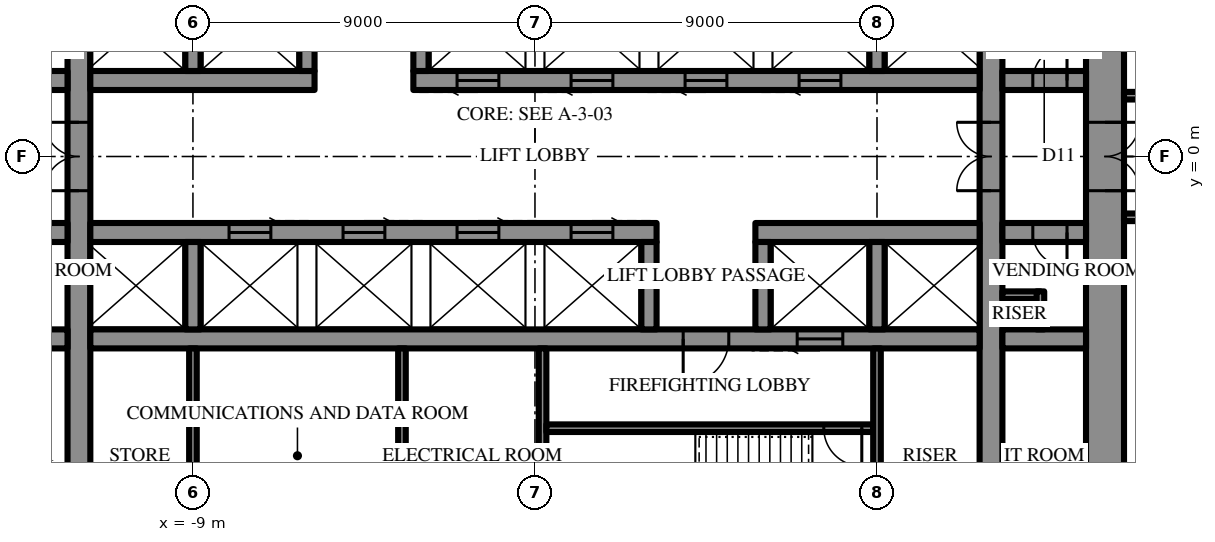
"""IFC4 building model, lengths in metres.
Left out: names, types, materials, properties, quantities, classifications, styles, units other than length and angle.
Written with IfcOpenShell. Run it as: python <this file> out.ifc"""

import sys

from ifc_helpers import new_model, si_unit, direction, frame, frame_2d, origin, place, context, subcontext, project, spatial, rectangle, extrude, element, fill, save


model = new_model("IFC4")
c1 = context("Model", 3, precision=1e-05, world=origin(), true_north=direction((0.0, 1.0)))
c2 = subcontext(c1, "Body", "Model", "MODEL_VIEW")
j1 = project(units=[si_unit("LENGTHUNIT", "METRE"), si_unit("PLANEANGLEUNIT", "RADIAN")], contexts=[c1])
p1 = place(None, origin())
s1 = spatial("IfcSite", under=j1, at=p1, CompositionType="ELEMENT")
p2 = place(p1, origin())
s2 = spatial("IfcBuilding", under=s1, at=p2, CompositionType="ELEMENT")
p3 = place(p2, frame((0.0, 0.0, 219.7)))
s3 = spatial("IfcBuildingStorey", under=s2, at=p3, CompositionType="ELEMENT", Elevation=219.7)
p4 = place(p3, frame((15.0, -10.7, 0.0), z_axis=(0.0, 0.0, 1.0), x_axis=(0.0, 1.0, 0.0)))
e1 = element("IfcWall", 1, at=p4, inside=s3, PredefinedType="SHEAR", context=c2, shape_type="SweptSolid", body=[
    extrude(rectangle(XDim=21.4, YDim=1.0, at=frame_2d((10.7, 0.0))), origin(), (0.0, 0.0, 1.0), 4.2),
])
p5 = place(p4, frame((9.8, 0.0, 0.0)))
e2 = element("IfcOpeningElement", 2, at=p5, cuts=e1, PredefinedType="OPENING", context=c2, shape_type="SweptSolid", body=[
    extrude(rectangle(XDim=1.8, YDim=2.4, at=frame_2d((0.9, 1.2))), frame((0.0, 0.51, 0.0), z_axis=(0.0, -1.0, 0.0), x_axis=(1.0, 0.0, 0.0)), (0.0, 0.0, 1.0), 1.02),
])
p6 = place(p3, frame((12.0, -10.7, 0.0), z_axis=(0.0, 0.0, 1.0), x_axis=(0.0, 1.0, 0.0)))
e3 = element("IfcWall", 3, at=p6, inside=s3, PredefinedType="SHEAR", context=c2, shape_type="SweptSolid", body=[
    extrude(rectangle(XDim=21.4, YDim=0.6, at=frame_2d((10.7, 0.0))), origin(), (0.0, 0.0, 1.0), 4.2),
])
p7 = place(p6, frame((9.8, 0.0, 0.0)))
e4 = element("IfcOpeningElement", 4, at=p7, cuts=e3, PredefinedType="OPENING", context=c2, shape_type="SweptSolid", body=[
    extrude(rectangle(XDim=1.8, YDim=2.4, at=frame_2d((0.9, 1.2))), frame((0.0, 0.31, 0.0), z_axis=(0.0, -1.0, 0.0), x_axis=(1.0, 0.0, 0.0)), (0.0, 0.0, 1.0), 0.62),
])
p8 = place(p3, frame((-12.0, -10.7, 0.0), z_axis=(0.0, 0.0, 1.0), x_axis=(0.0, 1.0, 0.0)))
e5 = element("IfcWall", 5, at=p8, inside=s3, PredefinedType="SHEAR", context=c2, shape_type="SweptSolid", body=[
    extrude(rectangle(XDim=21.4, YDim=0.6, at=frame_2d((10.7, 0.0))), origin(), (0.0, 0.0, 1.0), 4.2),
])
p9 = place(p8, frame((9.8, 0.0, 0.0)))
e6 = element("IfcOpeningElement", 6, at=p9, cuts=e5, PredefinedType="OPENING", context=c2, shape_type="SweptSolid", body=[
    extrude(rectangle(XDim=1.8, YDim=2.4, at=frame_2d((0.9, 1.2))), frame((0.0, 0.31, 0.0), z_axis=(0.0, -1.0, 0.0), x_axis=(1.0, 0.0, 0.0)), (0.0, 0.0, 1.0), 0.62),
])
p10 = place(p3, frame((-14.5, 2.0, 0.0), z_axis=(0.0, 0.0, 1.0), x_axis=(1.0, 0.0, 0.0)))
e7 = element("IfcWall", 7, at=p10, inside=s3, PredefinedType="SHEAR", context=c2, shape_type="SweptSolid", body=[
    extrude(rectangle(XDim=2.2, YDim=0.5, at=frame_2d((1.1, 0.0))), origin(), (0.0, 0.0, 1.0), 4.2),
])
p11 = place(p10, frame((0.5, 0.0, 0.0)))
e8 = element("IfcOpeningElement", 8, at=p11, cuts=e7, PredefinedType="OPENING", context=c2, shape_type="SweptSolid", body=[
    extrude(rectangle(XDim=0.9, YDim=2.2, at=frame_2d((0.45, 1.1))), frame((0.0, 0.26, 0.0), z_axis=(0.0, -1.0, 0.0), x_axis=(1.0, 0.0, 0.0)), (0.0, 0.0, 1.0), 0.52),
])
p12 = place(p3, frame((-11.7, 2.0, 0.0), z_axis=(0.0, 0.0, 1.0), x_axis=(1.0, 0.0, 0.0)))
e9 = element("IfcWall", 9, at=p12, inside=s3, PredefinedType="SHEAR", context=c2, shape_type="SweptSolid", body=[
    extrude(rectangle(XDim=5.9, YDim=0.5, at=frame_2d((2.95, 0.0))), origin(), (0.0, 0.0, 1.0), 4.2),
])
p13 = place(p3, frame((-3.2, 2.0, 0.0), z_axis=(0.0, 0.0, 1.0), x_axis=(1.0, 0.0, 0.0)))
e10 = element("IfcWall", 10, at=p13, inside=s3, PredefinedType="SHEAR", context=c2, shape_type="SweptSolid", body=[
    extrude(rectangle(XDim=14.9, YDim=0.5, at=frame_2d((7.45, 0.0))), origin(), (0.0, 0.0, 1.0), 4.2),
])
p14 = place(p13, frame((1.15, 0.0, 0.0)))
e11 = element("IfcOpeningElement", 11, at=p14, cuts=e10, PredefinedType="OPENING", context=c2, shape_type="SweptSolid", body=[
    extrude(rectangle(XDim=1.1, YDim=2.2, at=frame_2d((0.55, 1.1))), frame((0.0, 0.26, 0.0), z_axis=(0.0, -1.0, 0.0), x_axis=(1.0, 0.0, 0.0)), (0.0, 0.0, 1.0), 0.52),
])
p15 = place(p13, frame((4.15, 0.0, 0.0)))
e12 = element("IfcOpeningElement", 12, at=p15, cuts=e10, PredefinedType="OPENING", context=c2, shape_type="SweptSolid", body=[
    extrude(rectangle(XDim=1.1, YDim=2.2, at=frame_2d((0.55, 1.1))), frame((0.0, 0.26, 0.0), z_axis=(0.0, -1.0, 0.0), x_axis=(1.0, 0.0, 0.0)), (0.0, 0.0, 1.0), 0.52),
])
p16 = place(p13, frame((7.15, 0.0, 0.0)))
e13 = element("IfcOpeningElement", 13, at=p16, cuts=e10, PredefinedType="OPENING", context=c2, shape_type="SweptSolid", body=[
    extrude(rectangle(XDim=1.1, YDim=2.2, at=frame_2d((0.55, 1.1))), frame((0.0, 0.26, 0.0), z_axis=(0.0, -1.0, 0.0), x_axis=(1.0, 0.0, 0.0)), (0.0, 0.0, 1.0), 0.52),
])
p17 = place(p13, frame((10.15, 0.0, 0.0)))
e14 = element("IfcOpeningElement", 14, at=p17, cuts=e10, PredefinedType="OPENING", context=c2, shape_type="SweptSolid", body=[
    extrude(rectangle(XDim=1.1, YDim=2.2, at=frame_2d((0.55, 1.1))), frame((0.0, 0.26, 0.0), z_axis=(0.0, -1.0, 0.0), x_axis=(1.0, 0.0, 0.0)), (0.0, 0.0, 1.0), 0.52),
])
p18 = place(p3, frame((12.3, 2.0, 0.0), z_axis=(0.0, 0.0, 1.0), x_axis=(1.0, 0.0, 0.0)))
e15 = element("IfcWall", 15, at=p18, inside=s3, PredefinedType="SHEAR", context=c2, shape_type="SweptSolid", body=[
    extrude(rectangle(XDim=2.2, YDim=0.5, at=frame_2d((1.1, 0.0))), origin(), (0.0, 0.0, 1.0), 4.2),
])
p19 = place(p18, frame((0.8, 0.0, 0.0)))
e16 = element("IfcOpeningElement", 16, at=p19, cuts=e15, PredefinedType="OPENING", context=c2, shape_type="SweptSolid", body=[
    extrude(rectangle(XDim=0.9, YDim=2.2, at=frame_2d((0.45, 1.1))), frame((0.0, 0.26, 0.0), z_axis=(0.0, -1.0, 0.0), x_axis=(1.0, 0.0, 0.0)), (0.0, 0.0, 1.0), 0.52),
])
for number, where, z_axis, x_axis in (
    (17, (-9.0, 2.25, 0.0), (0.0, 0.0, 1.0), (0.0, 1.0, 0.0)),
    (18, (-6.0, 2.25, 0.0), (0.0, 0.0, 1.0), (0.0, 1.0, 0.0)),
    (19, (-3.0, 2.25, 0.0), (0.0, 0.0, 1.0), (0.0, 1.0, 0.0)),
    (20, (9.0, 2.25, 0.0), (0.0, 0.0, 1.0), (0.0, 1.0, 0.0)),
):
    element("IfcWall", number, at=place(p3, frame(where, z_axis=z_axis, x_axis=x_axis)), inside=s3, PredefinedType="SHEAR", context=c2, shape_type="SweptSolid", body=[
        extrude(rectangle(XDim=2.3, YDim=0.4, at=frame_2d((1.15, 0.0))), origin(), (0.0, 0.0, 1.0), 4.2),
    ])
p20 = place(p3, frame((14.5, -2.0, 0.0), z_axis=(0.0, 0.0, 1.0), x_axis=(-1.0, 0.0, 0.0)))
e21 = element("IfcWall", 21, at=p20, inside=s3, PredefinedType="SHEAR", context=c2, shape_type="SweptSolid", body=[
    extrude(rectangle(XDim=2.2, YDim=0.5, at=frame_2d((1.1, 0.0))), origin(), (0.0, 0.0, 1.0), 4.2),
])
p21 = place(p20, frame((0.5, 0.0, 0.0)))
e22 = element("IfcOpeningElement", 22, at=p21, cuts=e21, PredefinedType="OPENING", context=c2, shape_type="SweptSolid", body=[
    extrude(rectangle(XDim=0.9, YDim=2.2, at=frame_2d((0.45, 1.1))), frame((0.0, 0.26, 0.0), z_axis=(0.0, -1.0, 0.0), x_axis=(1.0, 0.0, 0.0)), (0.0, 0.0, 1.0), 0.52),
])
p22 = place(p3, frame((11.7, -2.0, 0.0), z_axis=(0.0, 0.0, 1.0), x_axis=(-1.0, 0.0, 0.0)))
e23 = element("IfcWall", 23, at=p22, inside=s3, PredefinedType="SHEAR", context=c2, shape_type="SweptSolid", body=[
    extrude(rectangle(XDim=5.9, YDim=0.5, at=frame_2d((2.95, 0.0))), origin(), (0.0, 0.0, 1.0), 4.2),
])
p23 = place(p3, frame((3.2, -2.0, 0.0), z_axis=(0.0, 0.0, 1.0), x_axis=(-1.0, 0.0, 0.0)))
e24 = element("IfcWall", 24, at=p23, inside=s3, PredefinedType="SHEAR", context=c2, shape_type="SweptSolid", body=[
    extrude(rectangle(XDim=14.9, YDim=0.5, at=frame_2d((7.45, 0.0))), origin(), (0.0, 0.0, 1.0), 4.2),
])
p24 = place(p23, frame((1.15, 0.0, 0.0)))
e25 = element("IfcOpeningElement", 25, at=p24, cuts=e24, PredefinedType="OPENING", context=c2, shape_type="SweptSolid", body=[
    extrude(rectangle(XDim=1.1, YDim=2.2, at=frame_2d((0.55, 1.1))), frame((0.0, 0.26, 0.0), z_axis=(0.0, -1.0, 0.0), x_axis=(1.0, 0.0, 0.0)), (0.0, 0.0, 1.0), 0.52),
])
p25 = place(p23, frame((4.15, 0.0, 0.0)))
e26 = element("IfcOpeningElement", 26, at=p25, cuts=e24, PredefinedType="OPENING", context=c2, shape_type="SweptSolid", body=[
    extrude(rectangle(XDim=1.1, YDim=2.2, at=frame_2d((0.55, 1.1))), frame((0.0, 0.26, 0.0), z_axis=(0.0, -1.0, 0.0), x_axis=(1.0, 0.0, 0.0)), (0.0, 0.0, 1.0), 0.52),
])
p26 = place(p23, frame((7.15, 0.0, 0.0)))
e27 = element("IfcOpeningElement", 27, at=p26, cuts=e24, PredefinedType="OPENING", context=c2, shape_type="SweptSolid", body=[
    extrude(rectangle(XDim=1.1, YDim=2.2, at=frame_2d((0.55, 1.1))), frame((0.0, 0.26, 0.0), z_axis=(0.0, -1.0, 0.0), x_axis=(1.0, 0.0, 0.0)), (0.0, 0.0, 1.0), 0.52),
])
p27 = place(p23, frame((10.15, 0.0, 0.0)))
e28 = element("IfcOpeningElement", 28, at=p27, cuts=e24, PredefinedType="OPENING", context=c2, shape_type="SweptSolid", body=[
    extrude(rectangle(XDim=1.1, YDim=2.2, at=frame_2d((0.55, 1.1))), frame((0.0, 0.26, 0.0), z_axis=(0.0, -1.0, 0.0), x_axis=(1.0, 0.0, 0.0)), (0.0, 0.0, 1.0), 0.52),
])
p28 = place(p3, frame((-12.3, -2.0, 0.0), z_axis=(0.0, 0.0, 1.0), x_axis=(-1.0, 0.0, 0.0)))
e29 = element("IfcWall", 29, at=p28, inside=s3, PredefinedType="SHEAR", context=c2, shape_type="SweptSolid", body=[
    extrude(rectangle(XDim=2.2, YDim=0.5, at=frame_2d((1.1, 0.0))), origin(), (0.0, 0.0, 1.0), 4.2),
])
p29 = place(p28, frame((0.8, 0.0, 0.0)))
e30 = element("IfcOpeningElement", 30, at=p29, cuts=e29, PredefinedType="OPENING", context=c2, shape_type="SweptSolid", body=[
    extrude(rectangle(XDim=0.9, YDim=2.2, at=frame_2d((0.45, 1.1))), frame((0.0, 0.26, 0.0), z_axis=(0.0, -1.0, 0.0), x_axis=(1.0, 0.0, 0.0)), (0.0, 0.0, 1.0), 0.52),
])
p30 = place(p3, frame((14.5, -4.8, 0.0), z_axis=(0.0, 0.0, 1.0), x_axis=(-1.0, 0.0, 0.0)))
e31 = element("IfcWall", 31, at=p30, inside=s3, PredefinedType="SHEAR", context=c2, shape_type="SweptSolid", body=[
    extrude(rectangle(XDim=2.2, YDim=0.5, at=frame_2d((1.1, 0.0))), origin(), (0.0, 0.0, 1.0), 4.2),
])
p31 = place(p3, frame((11.7, -4.8, 0.0), z_axis=(0.0, 0.0, 1.0), x_axis=(-1.0, 0.0, 0.0)))
e32 = element("IfcWall", 32, at=p31, inside=s3, PredefinedType="SHEAR", context=c2, shape_type="SweptSolid", body=[
    extrude(rectangle(XDim=23.4, YDim=0.5, at=frame_2d((11.7, 0.0))), origin(), (0.0, 0.0, 1.0), 4.2),
])
p32 = place(p31, frame((6.6, 0.0, 0.0)))
e33 = element("IfcOpeningElement", 33, at=p32, cuts=e32, PredefinedType="OPENING", context=c2, shape_type="SweptSolid", body=[
    extrude(rectangle(XDim=1.2, YDim=2.2, at=frame_2d((0.6, 1.1))), frame((0.0, 0.26, 0.0), z_axis=(0.0, -1.0, 0.0), x_axis=(1.0, 0.0, 0.0)), (0.0, 0.0, 1.0), 0.52),
])
p33 = place(p31, frame((3.6, 0.0, 0.0)))
e34 = element("IfcOpeningElement", 34, at=p33, cuts=e32, PredefinedType="OPENING", context=c2, shape_type="SweptSolid", body=[
    extrude(rectangle(XDim=1.2, YDim=2.2, at=frame_2d((0.6, 1.1))), frame((0.0, 0.26, 0.0), z_axis=(0.0, -1.0, 0.0), x_axis=(1.0, 0.0, 0.0)), (0.0, 0.0, 1.0), 0.52),
])
p34 = place(p3, frame((-12.3, -4.8, 0.0), z_axis=(0.0, 0.0, 1.0), x_axis=(-1.0, 0.0, 0.0)))
e35 = element("IfcWall", 35, at=p34, inside=s3, PredefinedType="SHEAR", context=c2, shape_type="SweptSolid", body=[
    extrude(rectangle(XDim=2.2, YDim=0.5, at=frame_2d((1.1, 0.0))), origin(), (0.0, 0.0, 1.0), 4.2),
])
for number, where, z_axis, x_axis in (
    (36, (9.0, -2.25, 0.0), (0.0, 0.0, 1.0), (0.0, -1.0, 0.0)),
    (37, (6.0, -2.25, 0.0), (0.0, 0.0, 1.0), (0.0, -1.0, 0.0)),
    (38, (3.0, -2.25, 0.0), (0.0, 0.0, 1.0), (0.0, -1.0, 0.0)),
    (39, (-9.0, -2.25, 0.0), (0.0, 0.0, 1.0), (0.0, -1.0, 0.0)),
):
    element("IfcWall", number, at=place(p3, frame(where, z_axis=z_axis, x_axis=x_axis)), inside=s3, PredefinedType="SHEAR", context=c2, shape_type="SweptSolid", body=[
        extrude(rectangle(XDim=2.3, YDim=0.4, at=frame_2d((1.15, 0.0))), origin(), (0.0, 0.0, 1.0), 4.2),
    ])
p35 = place(p3, frame((0.2, -5.05, 0.0), z_axis=(0.0, 0.0, 1.0), x_axis=(0.0, -1.0, 0.0)))
e40 = element("IfcWall", 40, at=p35, inside=s3, PredefinedType="SHEAR", context=c2, shape_type="SweptSolid", body=[
    extrude(rectangle(XDim=5.65, YDim=0.2, at=frame_2d((2.825, 0.0))), origin(), (0.0, 0.0, 1.0), 4.2),
])
p36 = place(p3, frame((8.9, -7.15, 0.0), z_axis=(0.0, 0.0, 1.0), x_axis=(-1.0, 0.0, 0.0)))
e41 = element("IfcWall", 41, at=p36, inside=s3, PredefinedType="SHEAR", context=c2, shape_type="SweptSolid", body=[
    extrude(rectangle(XDim=8.6, YDim=0.2, at=frame_2d((4.3, 0.0))), origin(), (0.0, 0.0, 1.0), 4.2),
])
p37 = place(p36, frame((0.3, 0.0, 0.0)))
e42 = element("IfcOpeningElement", 42, at=p37, cuts=e41, PredefinedType="OPENING", context=c2, shape_type="SweptSolid", body=[
    extrude(rectangle(XDim=1.0, YDim=2.2, at=frame_2d((0.5, 1.1))), frame((0.0, 0.11, 0.0), z_axis=(0.0, -1.0, 0.0), x_axis=(1.0, 0.0, 0.0)), (0.0, 0.0, 1.0), 0.22),
])
for number, where, z_axis, x_axis in (
    (43, (9.0, -5.05, 0.0), (0.0, 0.0, 1.0), (0.0, -1.0, 0.0)),
    (44, (-9.0, -5.05, 0.0), (0.0, 0.0, 1.0), (0.0, -1.0, 0.0)),
    (45, (-3.5, -5.05, 0.0), (0.0, 0.0, 1.0), (0.0, -1.0, 0.0)),
):
    element("IfcWall", number, at=place(p3, frame(where, z_axis=z_axis, x_axis=x_axis)), inside=s3, PredefinedType="PARTITIONING", context=c2, shape_type="SweptSolid", body=[
        extrude(rectangle(XDim=5.65, YDim=0.2, at=frame_2d((2.825, 0.0))), origin(), (0.0, 0.0, 1.0), 4.0),
    ])
for number, where, z_axis, x_axis in (
    (46, (13.3, -3.65, 0.0), (0.0, 0.0, 1.0), (-1.0, 0.0, 0.0)),
    (47, (13.3, -3.55, 0.0), (0.0, 0.0, 1.0), (0.0, -1.0, 0.0)),
):
    element("IfcWall", number, at=place(p3, frame(where, z_axis=z_axis, x_axis=x_axis)), inside=s3, PredefinedType="PARTITIONING", context=c2, shape_type="SweptSolid", body=[
        extrude(rectangle(XDim=1.0, YDim=0.2, at=frame_2d((0.5, 0.0))), origin(), (0.0, 0.0, 1.0), 4.0),
    ])
for number, where, z_axis, x_axis in (
    (48, (15.5, 1.6, 0.0), (0.0, 0.0, 1.0), (1.0, 0.0, 0.0)),
    (49, (15.5, -1.6, 0.0), (0.0, 0.0, 1.0), (1.0, 0.0, 0.0)),
):
    element("IfcWall", number, at=place(p3, frame(where, z_axis=z_axis, x_axis=x_axis)), inside=s3, PredefinedType="PARTITIONING", context=c2, shape_type="SweptSolid", body=[
        extrude(rectangle(XDim=2.3, YDim=0.2, at=frame_2d((1.15, 0.0))), origin(), (0.0, 0.0, 1.0), 4.0),
    ])
p38 = place(p5, frame((1.8, 0.0, 0.0), z_axis=(0.0, 0.0, 1.0), x_axis=(-1.0, 0.0, 0.0)))
e50 = element("IfcDoor", 50, at=p38, inside=s3, OperationType="DOUBLE_DOOR_SINGLE_SWING", PredefinedType="DOOR", context=c2, shape_type="SweptSolid", body=[
    extrude(rectangle(XDim=1.8, YDim=2.4, at=frame_2d((0.9, 1.2))), frame((0.0, 0.025, 0.0), z_axis=(0.0, -1.0, 0.0), x_axis=(1.0, 0.0, 0.0)), (0.0, 0.0, 1.0), 0.05),
])
fill(e2, e50)
p39 = place(p32, origin())
e51 = element("IfcDoor", 51, at=p39, inside=s3, OperationType="SINGLE_SWING_LEFT", PredefinedType="DOOR", context=c2, shape_type="SweptSolid", body=[
    extrude(rectangle(XDim=1.2, YDim=2.2, at=frame_2d((0.6, 1.1))), frame((0.0, 0.025, 0.0), z_axis=(0.0, -1.0, 0.0), x_axis=(1.0, 0.0, 0.0)), (0.0, 0.0, 1.0), 0.05),
])
fill(e33, e51)
p40 = place(p37, origin())
e52 = element("IfcDoor", 52, at=p40, inside=s3, OperationType="SINGLE_SWING_RIGHT", PredefinedType="DOOR", context=c2, shape_type="SweptSolid", body=[
    extrude(rectangle(XDim=1.0, YDim=2.2, at=frame_2d((0.5, 1.1))), frame((0.0, 0.025, 0.0), z_axis=(0.0, -1.0, 0.0), x_axis=(1.0, 0.0, 0.0)), (0.0, 0.0, 1.0), 0.05),
])
fill(e42, e52)
p41 = place(p19, origin())
e53 = element("IfcDoor", 53, at=p41, inside=s3, OperationType="SINGLE_SWING_LEFT", PredefinedType="DOOR", context=c2, shape_type="SweptSolid", body=[
    extrude(rectangle(XDim=0.9, YDim=2.2, at=frame_2d((0.45, 1.1))), frame((0.0, 0.025, 0.0), z_axis=(0.0, -1.0, 0.0), x_axis=(1.0, 0.0, 0.0)), (0.0, 0.0, 1.0), 0.05),
])
fill(e16, e53)
p42 = place(p21, origin())
e54 = element("IfcDoor", 54, at=p42, inside=s3, OperationType="SINGLE_SWING_RIGHT", PredefinedType="DOOR", context=c2, shape_type="SweptSolid", body=[
    extrude(rectangle(XDim=0.9, YDim=2.2, at=frame_2d((0.45, 1.1))), frame((0.0, 0.025, 0.0), z_axis=(0.0, -1.0, 0.0), x_axis=(1.0, 0.0, 0.0)), (0.0, 0.0, 1.0), 0.05),
])
fill(e22, e54)
p43 = place(p7, origin())
e55 = element("IfcDoor", 55, at=p43, inside=s3, OperationType="DOUBLE_DOOR_SINGLE_SWING", PredefinedType="DOOR", context=c2, shape_type="SweptSolid", body=[
    extrude(rectangle(XDim=1.8, YDim=2.4, at=frame_2d((0.9, 1.2))), frame((0.0, 0.025, 0.0), z_axis=(0.0, -1.0, 0.0), x_axis=(1.0, 0.0, 0.0)), (0.0, 0.0, 1.0), 0.05),
])
fill(e4, e55)
p44 = place(p9, origin())
e56 = element("IfcDoor", 56, at=p44, inside=s3, OperationType="DOUBLE_DOOR_SINGLE_SWING", PredefinedType="DOOR", context=c2, shape_type="SweptSolid", body=[
    extrude(rectangle(XDim=1.8, YDim=2.4, at=frame_2d((0.9, 1.2))), frame((0.0, 0.025, 0.0), z_axis=(0.0, -1.0, 0.0), x_axis=(1.0, 0.0, 0.0)), (0.0, 0.0, 1.0), 0.05),
])
fill(e6, e56)
p45 = place(p14, frame((1.1, 0.0, 0.0), z_axis=(0.0, 0.0, 1.0), x_axis=(-1.0, 0.0, 0.0)))
e57 = element("IfcDoor", 57, at=p45, inside=s3, OperationType="SLIDING_TO_LEFT", PredefinedType="DOOR", context=c2, shape_type="SweptSolid", body=[
    extrude(rectangle(XDim=1.1, YDim=2.2, at=frame_2d((0.55, 1.1))), frame((0.0, 0.025, 0.0), z_axis=(0.0, -1.0, 0.0), x_axis=(1.0, 0.0, 0.0)), (0.0, 0.0, 1.0), 0.05),
])
fill(e11, e57)
p46 = place(p15, frame((1.1, 0.0, 0.0), z_axis=(0.0, 0.0, 1.0), x_axis=(-1.0, 0.0, 0.0)))
e58 = element("IfcDoor", 58, at=p46, inside=s3, OperationType="SLIDING_TO_LEFT", PredefinedType="DOOR", context=c2, shape_type="SweptSolid", body=[
    extrude(rectangle(XDim=1.1, YDim=2.2, at=frame_2d((0.55, 1.1))), frame((0.0, 0.025, 0.0), z_axis=(0.0, -1.0, 0.0), x_axis=(1.0, 0.0, 0.0)), (0.0, 0.0, 1.0), 0.05),
])
fill(e12, e58)
p47 = place(p16, frame((1.1, 0.0, 0.0), z_axis=(0.0, 0.0, 1.0), x_axis=(-1.0, 0.0, 0.0)))
e59 = element("IfcDoor", 59, at=p47, inside=s3, OperationType="SLIDING_TO_LEFT", PredefinedType="DOOR", context=c2, shape_type="SweptSolid", body=[
    extrude(rectangle(XDim=1.1, YDim=2.2, at=frame_2d((0.55, 1.1))), frame((0.0, 0.025, 0.0), z_axis=(0.0, -1.0, 0.0), x_axis=(1.0, 0.0, 0.0)), (0.0, 0.0, 1.0), 0.05),
])
fill(e13, e59)
p48 = place(p17, frame((1.1, 0.0, 0.0), z_axis=(0.0, 0.0, 1.0), x_axis=(-1.0, 0.0, 0.0)))
e60 = element("IfcDoor", 60, at=p48, inside=s3, OperationType="SLIDING_TO_LEFT", PredefinedType="DOOR", context=c2, shape_type="SweptSolid", body=[
    extrude(rectangle(XDim=1.1, YDim=2.2, at=frame_2d((0.55, 1.1))), frame((0.0, 0.025, 0.0), z_axis=(0.0, -1.0, 0.0), x_axis=(1.0, 0.0, 0.0)), (0.0, 0.0, 1.0), 0.05),
])
fill(e14, e60)
p49 = place(p33, origin())
e61 = element("IfcDoor", 61, at=p49, inside=s3, OperationType="SLIDING_TO_LEFT", PredefinedType="DOOR", context=c2, shape_type="SweptSolid", body=[
    extrude(rectangle(XDim=1.2, YDim=2.2, at=frame_2d((0.6, 1.1))), frame((0.0, 0.025, 0.0), z_axis=(0.0, -1.0, 0.0), x_axis=(1.0, 0.0, 0.0)), (0.0, 0.0, 1.0), 0.05),
])
fill(e34, e61)
p50 = place(p24, frame((1.1, 0.0, 0.0), z_axis=(0.0, 0.0, 1.0), x_axis=(-1.0, 0.0, 0.0)))
e62 = element("IfcDoor", 62, at=p50, inside=s3, OperationType="SLIDING_TO_LEFT", PredefinedType="DOOR", context=c2, shape_type="SweptSolid", body=[
    extrude(rectangle(XDim=1.1, YDim=2.2, at=frame_2d((0.55, 1.1))), frame((0.0, 0.025, 0.0), z_axis=(0.0, -1.0, 0.0), x_axis=(1.0, 0.0, 0.0)), (0.0, 0.0, 1.0), 0.05),
])
fill(e25, e62)
p51 = place(p25, frame((1.1, 0.0, 0.0), z_axis=(0.0, 0.0, 1.0), x_axis=(-1.0, 0.0, 0.0)))
e63 = element("IfcDoor", 63, at=p51, inside=s3, OperationType="SLIDING_TO_LEFT", PredefinedType="DOOR", context=c2, shape_type="SweptSolid", body=[
    extrude(rectangle(XDim=1.1, YDim=2.2, at=frame_2d((0.55, 1.1))), frame((0.0, 0.025, 0.0), z_axis=(0.0, -1.0, 0.0), x_axis=(1.0, 0.0, 0.0)), (0.0, 0.0, 1.0), 0.05),
])
fill(e26, e63)
p52 = place(p26, frame((1.1, 0.0, 0.0), z_axis=(0.0, 0.0, 1.0), x_axis=(-1.0, 0.0, 0.0)))
e64 = element("IfcDoor", 64, at=p52, inside=s3, OperationType="SLIDING_TO_LEFT", PredefinedType="DOOR", context=c2, shape_type="SweptSolid", body=[
    extrude(rectangle(XDim=1.1, YDim=2.2, at=frame_2d((0.55, 1.1))), frame((0.0, 0.025, 0.0), z_axis=(0.0, -1.0, 0.0), x_axis=(1.0, 0.0, 0.0)), (0.0, 0.0, 1.0), 0.05),
])
fill(e27, e64)
p53 = place(p27, frame((1.1, 0.0, 0.0), z_axis=(0.0, 0.0, 1.0), x_axis=(-1.0, 0.0, 0.0)))
e65 = element("IfcDoor", 65, at=p53, inside=s3, OperationType="SLIDING_TO_LEFT", PredefinedType="DOOR", context=c2, shape_type="SweptSolid", body=[
    extrude(rectangle(XDim=1.1, YDim=2.2, at=frame_2d((0.55, 1.1))), frame((0.0, 0.025, 0.0), z_axis=(0.0, -1.0, 0.0), x_axis=(1.0, 0.0, 0.0)), (0.0, 0.0, 1.0), 0.05),
])
fill(e28, e65)
save(model, sys.argv[1])
